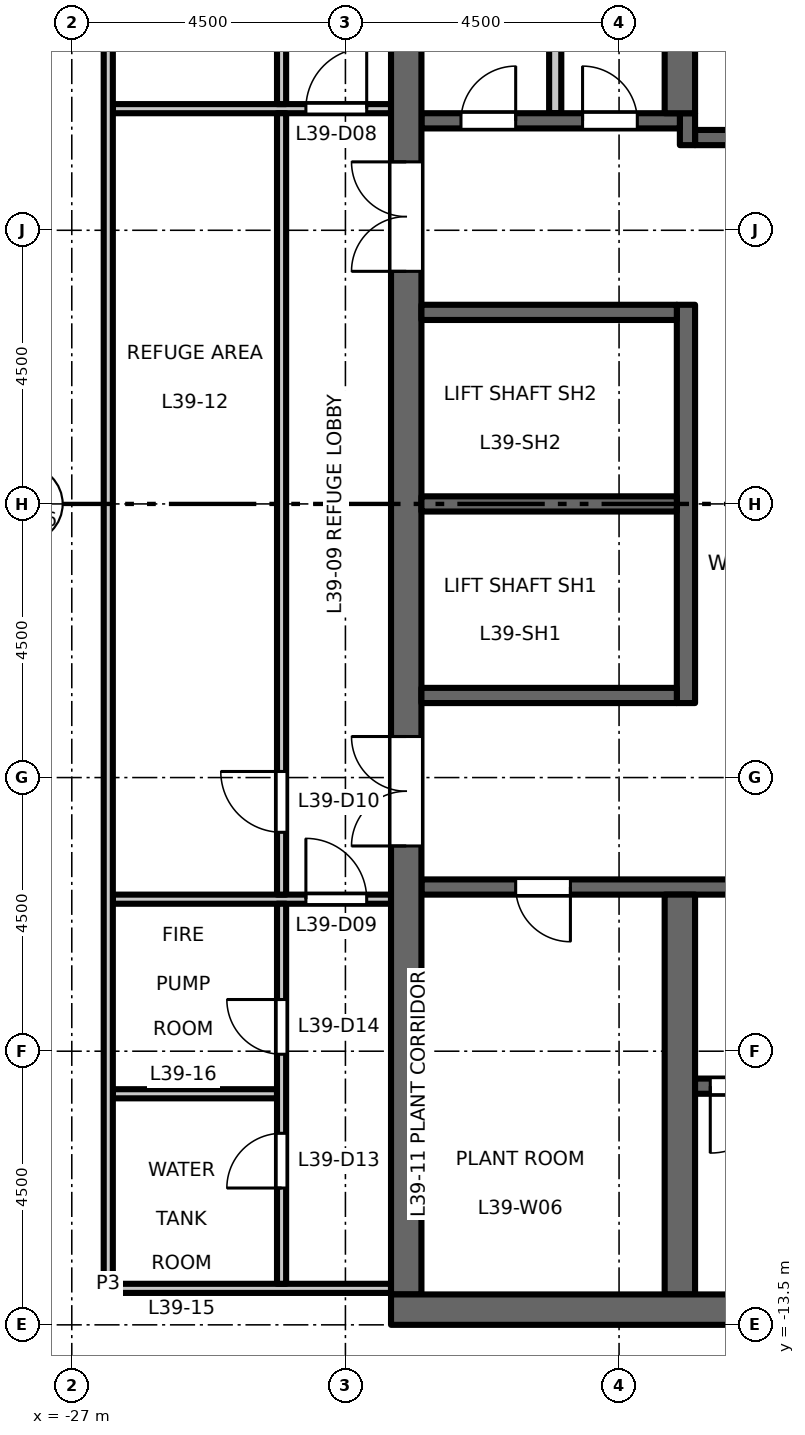
"""IFC4 building model, lengths in metres.
Left out: names, types, materials, properties, quantities, classifications, styles, units other than length and angle.
Written with IfcOpenShell. Run it as: python <this file> out.ifc"""

import sys

from ifc_helpers import new_model, si_unit, direction, frame, frame_2d, origin, place, context, subcontext, project, spatial, rectangle, extrude, element, fill, save


model = new_model("IFC4")
c1 = context("Model", 3, precision=1e-05, world=origin(), true_north=direction((0.0, 1.0)))
c2 = subcontext(c1, "Body", "Model", "MODEL_VIEW")
j1 = project(units=[si_unit("LENGTHUNIT", "METRE"), si_unit("PLANEANGLEUNIT", "RADIAN")], contexts=[c1])
p1 = place(None, origin())
s1 = spatial("IfcSite", under=j1, at=p1, CompositionType="ELEMENT")
p2 = place(p1, origin())
s2 = spatial("IfcBuilding", under=s1, at=p2, CompositionType="ELEMENT")
p3 = place(p2, frame((0.0, 0.0, 181.2)))
s3 = spatial("IfcBuildingStorey", under=s2, at=p3, CompositionType="ELEMENT", Elevation=181.2)
p4 = place(p3, frame((-12.15, 6.025, 0.0), z_axis=(0.0, 0.0, 1.0), x_axis=(-1.0, 0.0, 0.0)))
e1 = element("IfcWall", 1, at=p4, inside=s3, PredefinedType="SHEAR", context=c2, shape_type="SweptSolid", body=[
    extrude(rectangle(XDim=4.6, YDim=0.25, at=frame_2d((2.3, 0.0))), origin(), (0.0, 0.0, 1.0), 5.8),
])
p5 = place(p4, frame((1.8, 0.0, 0.0)))
e2 = element("IfcOpeningElement", 2, at=p5, cuts=e1, PredefinedType="OPENING", context=c2, shape_type="SweptSolid", body=[
    extrude(rectangle(XDim=1.0, YDim=2.1, at=frame_2d((0.5, 1.05))), frame((0.0, 0.135, 0.0), z_axis=(0.0, -1.0, 0.0), x_axis=(1.0, 0.0, 0.0)), (0.0, 0.0, 1.0), 0.27),
])
p6 = place(p3, frame((-16.875, 5.9, 0.0), z_axis=(0.0, 0.0, 1.0), x_axis=(0.0, 1.0, 0.0)))
e3 = element("IfcWall", 3, at=p6, inside=s3, PredefinedType="SHEAR", context=c2, shape_type="SweptSolid", body=[
    extrude(rectangle(XDim=0.525, YDim=0.25, at=frame_2d((0.263, 0.0))), origin(), (0.0, 0.0, 1.0), 5.8),
])
p7 = place(p3, frame((-17.0, 6.3, 0.0), z_axis=(0.0, 0.0, 1.0), x_axis=(-1.0, 0.0, 0.0)))
e4 = element("IfcWall", 4, at=p7, inside=s3, PredefinedType="SHEAR", context=c2, shape_type="SweptSolid", body=[
    extrude(rectangle(XDim=4.25, YDim=0.25, at=frame_2d((2.125, 0.0))), origin(), (0.0, 0.0, 1.0), 5.8),
])
p8 = place(p7, frame((0.7, 0.0, 0.0)))
e5 = element("IfcOpeningElement", 5, at=p8, cuts=e4, PredefinedType="OPENING", context=c2, shape_type="SweptSolid", body=[
    extrude(rectangle(XDim=0.9, YDim=2.1, at=frame_2d((0.45, 1.05))), frame((0.0, 0.135, 0.0), z_axis=(0.0, -1.0, 0.0), x_axis=(1.0, 0.0, 0.0)), (0.0, 0.0, 1.0), 0.27),
])
p9 = place(p7, frame((2.7, 0.0, 0.0)))
e6 = element("IfcOpeningElement", 6, at=p9, cuts=e4, PredefinedType="OPENING", context=c2, shape_type="SweptSolid", body=[
    extrude(rectangle(XDim=0.9, YDim=2.1, at=frame_2d((0.45, 1.05))), frame((0.0, 0.135, 0.0), z_axis=(0.0, -1.0, 0.0), x_axis=(1.0, 0.0, 0.0)), (0.0, 0.0, 1.0), 0.27),
])
p10 = place(p3, frame((-12.15, -6.3, 0.0), z_axis=(0.0, 0.0, 1.0), x_axis=(-1.0, 0.0, 0.0)))
e7 = element("IfcWall", 7, at=p10, inside=s3, PredefinedType="SHEAR", context=c2, shape_type="SweptSolid", body=[
    extrude(rectangle(XDim=9.1, YDim=0.25, at=frame_2d((4.55, 0.0))), origin(), (0.0, 0.0, 1.0), 5.8),
])
p11 = place(p10, frame((1.8, 0.0, 0.0)))
e8 = element("IfcOpeningElement", 8, at=p11, cuts=e7, PredefinedType="OPENING", context=c2, shape_type="SweptSolid", body=[
    extrude(rectangle(XDim=1.0, YDim=2.1, at=frame_2d((0.5, 1.05))), frame((0.0, 0.135, 0.0), z_axis=(0.0, -1.0, 0.0), x_axis=(1.0, 0.0, 0.0)), (0.0, 0.0, 1.0), 0.27),
])
p12 = place(p10, frame((6.65, 0.0, 0.0)))
e9 = element("IfcOpeningElement", 9, at=p12, cuts=e7, PredefinedType="OPENING", context=c2, shape_type="SweptSolid", body=[
    extrude(rectangle(XDim=0.9, YDim=2.1, at=frame_2d((0.45, 1.05))), frame((0.0, 0.135, 0.0), z_axis=(0.0, -1.0, 0.0), x_axis=(1.0, 0.0, 0.0)), (0.0, 0.0, 1.0), 0.27),
])
p13 = place(p3, frame((-21.5, -13.0, 0.0), z_axis=(0.0, 0.0, 1.0), x_axis=(0.0, 1.0, 0.0)))
e10 = element("IfcWall", 10, at=p13, inside=s3, PredefinedType="SHEAR", context=c2, shape_type="SweptSolid", body=[
    extrude(rectangle(XDim=26.0, YDim=0.5, at=frame_2d((13.0, 0.0))), origin(), (0.0, 0.0, 1.0), 5.8),
])
p14 = place(p13, frame((16.825, 0.0, 0.0)))
e11 = element("IfcOpeningElement", 11, at=p14, cuts=e10, PredefinedType="OPENING", context=c2, shape_type="SweptSolid", body=[
    extrude(rectangle(XDim=1.8, YDim=2.1, at=frame_2d((0.9, 1.05))), frame((0.0, 0.26, 0.0), z_axis=(0.0, -1.0, 0.0), x_axis=(1.0, 0.0, 0.0)), (0.0, 0.0, 1.0), 0.52),
])
p15 = place(p13, frame((7.375, 0.0, 0.0)))
e12 = element("IfcOpeningElement", 12, at=p15, cuts=e10, PredefinedType="OPENING", context=c2, shape_type="SweptSolid", body=[
    extrude(rectangle(XDim=1.8, YDim=2.1, at=frame_2d((0.9, 1.05))), frame((0.0, 0.26, 0.0), z_axis=(0.0, -1.0, 0.0), x_axis=(1.0, 0.0, 0.0)), (0.0, 0.0, 1.0), 0.52),
])
p16 = place(p3, frame((-19.05, 6.425, 0.0), z_axis=(0.0, 0.0, 1.0), x_axis=(0.0, 1.0, 0.0)))
e13 = element("IfcWall", 13, at=p16, inside=s3, PredefinedType="PARTITIONING", context=c2, shape_type="SweptSolid", body=[
    extrude(rectangle(XDim=6.575, YDim=0.2, at=frame_2d((3.288, 0.0))), origin(), (0.0, 0.0, 1.0), 5.8),
])
p17 = place(p3, frame((-16.9, -3.275, 0.0), z_axis=(0.0, 0.0, 1.0), x_axis=(0.0, 1.0, 0.0)))
e14 = element("IfcWall", 14, at=p17, inside=s3, PredefinedType="SHEAR", context=c2, shape_type="SweptSolid", body=[
    extrude(rectangle(XDim=6.55, YDim=0.3, at=frame_2d((3.275, 0.0))), origin(), (0.0, 0.0, 1.0), 5.8),
])
for number, where, z_axis, x_axis in (
    (15, (-17.05, 0.0, 0.0), (0.0, 0.0, 1.0), (-1.0, 0.0, 0.0)),
    (16, (-17.05, 3.15, 0.0), (0.0, 0.0, 1.0), (-1.0, 0.0, 0.0)),
    (17, (-17.05, -3.15, 0.0), (0.0, 0.0, 1.0), (-1.0, 0.0, 0.0)),
):
    element("IfcWall", number, at=place(p3, frame(where, z_axis=z_axis, x_axis=x_axis)), inside=s3, PredefinedType="SHEAR", context=c2, shape_type="SweptSolid", body=[
        extrude(rectangle(XDim=4.2, YDim=0.25, at=frame_2d((2.1, 0.0))), origin(), (0.0, 0.0, 1.0), 5.8),
    ])
for number, where, z_axis, x_axis in (
    (18, (-17.0, 6.425, 0.0), (0.0, 0.0, 1.0), (0.0, 1.0, 0.0)),
    (19, (-17.0, -13.0, 0.0), (0.0, 0.0, 1.0), (0.0, 1.0, 0.0)),
):
    element("IfcWall", number, at=place(p3, frame(where, z_axis=z_axis, x_axis=x_axis)), inside=s3, PredefinedType="SHEAR", context=c2, shape_type="SweptSolid", body=[
        extrude(rectangle(XDim=6.575, YDim=0.5, at=frame_2d((3.288, 0.0))), origin(), (0.0, 0.0, 1.0), 5.8),
    ])
p18 = place(p3, frame((-8.75, -9.575, 0.0), z_axis=(0.0, 0.0, 1.0), x_axis=(-1.0, 0.0, 0.0)))
e20 = element("IfcWall", 20, at=p18, inside=s3, PredefinedType="SHEAR", context=c2, shape_type="SweptSolid", body=[
    extrude(rectangle(XDim=8.0, YDim=0.25, at=frame_2d((4.0, 0.0))), origin(), (0.0, 0.0, 1.0), 5.8),
])
p19 = place(p18, frame((6.65, 0.0, 0.0)))
e21 = element("IfcOpeningElement", 21, at=p19, cuts=e20, PredefinedType="OPENING", context=c2, shape_type="SweptSolid", body=[
    extrude(rectangle(XDim=1.1, YDim=2.1, at=frame_2d((0.55, 1.05))), frame((0.0, 0.135, 0.0), z_axis=(0.0, -1.0, 0.0), x_axis=(1.0, 0.0, 0.0)), (0.0, 0.0, 1.0), 0.27),
])
p20 = place(p3, frame((-8.25, -13.25, 0.0), z_axis=(0.0, 0.0, 1.0), x_axis=(-1.0, 0.0, 0.0)))
e22 = element("IfcWall", 22, at=p20, inside=s3, PredefinedType="SHEAR", context=c2, shape_type="SweptSolid", body=[
    extrude(rectangle(XDim=13.5, YDim=0.5, at=frame_2d((6.75, 0.0))), origin(), (0.0, 0.0, 1.0), 5.8),
])
p21 = place(p3, frame((-26.475, -12.9, 0.0), z_axis=(0.0, 0.0, 1.0), x_axis=(1.0, 0.0, 0.0)))
e23 = element("IfcWall", 23, at=p21, inside=s3, PredefinedType="PARTITIONING", context=c2, shape_type="SweptSolid", body=[
    extrude(rectangle(XDim=4.725, YDim=0.15, at=frame_2d((2.363, 0.0))), origin(), (0.0, 0.0, 1.0), 5.8),
])
p22 = place(p3, frame((-26.325, -9.7, 0.0), z_axis=(0.0, 0.0, 1.0), x_axis=(1.0, 0.0, 0.0)))
e24 = element("IfcWall", 24, at=p22, inside=s3, PredefinedType="PARTITIONING", context=c2, shape_type="SweptSolid", body=[
    extrude(rectangle(XDim=2.7, YDim=0.15, at=frame_2d((1.35, 0.0))), origin(), (0.0, 0.0, 1.0), 5.8),
])
p23 = place(p3, frame((-26.325, -6.5, 0.0), z_axis=(0.0, 0.0, 1.0), x_axis=(1.0, 0.0, 0.0)))
e25 = element("IfcWall", 25, at=p23, inside=s3, PredefinedType="PARTITIONING", context=c2, shape_type="SweptSolid", body=[
    extrude(rectangle(XDim=4.575, YDim=0.15, at=frame_2d((2.288, 0.0))), origin(), (0.0, 0.0, 1.0), 5.8),
])
p24 = place(p23, frame((3.175, 0.0, 0.0)))
e26 = element("IfcOpeningElement", 26, at=p24, cuts=e25, PredefinedType="OPENING", context=c2, shape_type="SweptSolid", body=[
    extrude(rectangle(XDim=1.0, YDim=2.1, at=frame_2d((0.5, 1.05))), frame((0.0, 0.085, 0.0), z_axis=(0.0, -1.0, 0.0), x_axis=(1.0, 0.0, 0.0)), (0.0, 0.0, 1.0), 0.17),
])
p25 = place(p3, frame((-26.325, 6.5, 0.0), z_axis=(0.0, 0.0, 1.0), x_axis=(1.0, 0.0, 0.0)))
e27 = element("IfcWall", 27, at=p25, inside=s3, PredefinedType="PARTITIONING", context=c2, shape_type="SweptSolid", body=[
    extrude(rectangle(XDim=4.575, YDim=0.15, at=frame_2d((2.288, 0.0))), origin(), (0.0, 0.0, 1.0), 5.8),
])
p26 = place(p25, frame((3.175, 0.0, 0.0)))
e28 = element("IfcOpeningElement", 28, at=p26, cuts=e27, PredefinedType="OPENING", context=c2, shape_type="SweptSolid", body=[
    extrude(rectangle(XDim=1.0, YDim=2.1, at=frame_2d((0.5, 1.05))), frame((0.0, 0.085, 0.0), z_axis=(0.0, -1.0, 0.0), x_axis=(1.0, 0.0, 0.0)), (0.0, 0.0, 1.0), 0.17),
])
p27 = place(p3, frame((-26.4, -12.825, 0.0), z_axis=(0.0, 0.0, 1.0), x_axis=(0.0, 1.0, 0.0)))
e29 = element("IfcWall", 29, at=p27, inside=s3, PredefinedType="PARTITIONING", context=c2, shape_type="SweptSolid", body=[
    extrude(rectangle(XDim=25.65, YDim=0.15, at=frame_2d((12.825, 0.0))), origin(), (0.0, 0.0, 1.0), 5.8),
])
p28 = place(p3, frame((-23.55, -12.825, 0.0), z_axis=(0.0, 0.0, 1.0), x_axis=(0.0, 1.0, 0.0)))
e30 = element("IfcWall", 30, at=p28, inside=s3, PredefinedType="PARTITIONING", context=c2, shape_type="SweptSolid", body=[
    extrude(rectangle(XDim=6.25, YDim=0.15, at=frame_2d((3.125, 0.0))), origin(), (0.0, 0.0, 1.0), 5.8),
])
p29 = place(p28, frame((1.575, 0.0, 0.0)))
e31 = element("IfcOpeningElement", 31, at=p29, cuts=e30, PredefinedType="OPENING", context=c2, shape_type="SweptSolid", body=[
    extrude(rectangle(XDim=0.9, YDim=2.1, at=frame_2d((0.45, 1.05))), frame((0.0, 0.085, 0.0), z_axis=(0.0, -1.0, 0.0), x_axis=(1.0, 0.0, 0.0)), (0.0, 0.0, 1.0), 0.17),
])
p30 = place(p28, frame((3.775, 0.0, 0.0)))
e32 = element("IfcOpeningElement", 32, at=p30, cuts=e30, PredefinedType="OPENING", context=c2, shape_type="SweptSolid", body=[
    extrude(rectangle(XDim=0.9, YDim=2.1, at=frame_2d((0.45, 1.05))), frame((0.0, 0.085, 0.0), z_axis=(0.0, -1.0, 0.0), x_axis=(1.0, 0.0, 0.0)), (0.0, 0.0, 1.0), 0.17),
])
p31 = place(p3, frame((-23.55, -6.425, 0.0), z_axis=(0.0, 0.0, 1.0), x_axis=(0.0, 1.0, 0.0)))
e33 = element("IfcWall", 33, at=p31, inside=s3, PredefinedType="PARTITIONING", context=c2, shape_type="SweptSolid", body=[
    extrude(rectangle(XDim=12.85, YDim=0.15, at=frame_2d((6.425, 0.0))), origin(), (0.0, 0.0, 1.0), 5.8),
])
p32 = place(p31, frame((1.025, 0.0, 0.0)))
e34 = element("IfcOpeningElement", 34, at=p32, cuts=e33, PredefinedType="OPENING", context=c2, shape_type="SweptSolid", body=[
    extrude(rectangle(XDim=1.0, YDim=2.1, at=frame_2d((0.5, 1.05))), frame((0.0, 0.085, 0.0), z_axis=(0.0, -1.0, 0.0), x_axis=(1.0, 0.0, 0.0)), (0.0, 0.0, 1.0), 0.17),
])
p33 = place(p3, frame((-23.55, 6.575, 0.0), z_axis=(0.0, 0.0, 1.0), x_axis=(0.0, 1.0, 0.0)))
e35 = element("IfcWall", 35, at=p33, inside=s3, PredefinedType="PARTITIONING", context=c2, shape_type="SweptSolid", body=[
    extrude(rectangle(XDim=6.25, YDim=0.15, at=frame_2d((3.125, 0.0))), origin(), (0.0, 0.0, 1.0), 5.8),
])
p34 = place(p33, frame((1.575, 0.0, 0.0)))
e36 = element("IfcOpeningElement", 36, at=p34, cuts=e35, PredefinedType="OPENING", context=c2, shape_type="SweptSolid", body=[
    extrude(rectangle(XDim=0.9, YDim=2.1, at=frame_2d((0.45, 1.05))), frame((0.0, 0.085, 0.0), z_axis=(0.0, -1.0, 0.0), x_axis=(1.0, 0.0, 0.0)), (0.0, 0.0, 1.0), 0.17),
])
p35 = place(p33, frame((3.775, 0.0, 0.0)))
e37 = element("IfcOpeningElement", 37, at=p35, cuts=e35, PredefinedType="OPENING", context=c2, shape_type="SweptSolid", body=[
    extrude(rectangle(XDim=0.9, YDim=2.1, at=frame_2d((0.45, 1.05))), frame((0.0, 0.085, 0.0), z_axis=(0.0, -1.0, 0.0), x_axis=(1.0, 0.0, 0.0)), (0.0, 0.0, 1.0), 0.17),
])
p36 = place(p19, origin())
e38 = element("IfcDoor", 38, at=p36, inside=s3, OperationType="SINGLE_SWING_LEFT", PredefinedType="DOOR", context=c2, shape_type="SweptSolid", body=[
    extrude(rectangle(XDim=1.1, YDim=2.1, at=frame_2d((0.55, 1.05))), frame((0.0, 0.025, 0.0), z_axis=(0.0, -1.0, 0.0), x_axis=(1.0, 0.0, 0.0)), (0.0, 0.0, 1.0), 0.05),
])
fill(e21, e38)
p37 = place(p14, origin())
e39 = element("IfcDoor", 39, at=p37, inside=s3, OperationType="DOUBLE_DOOR_DOUBLE_SWING", PredefinedType="DOOR", context=c2, shape_type="SweptSolid", body=[
    extrude(rectangle(XDim=1.8, YDim=2.1, at=frame_2d((0.9, 1.05))), frame((0.0, 0.025, 0.0), z_axis=(0.0, -1.0, 0.0), x_axis=(1.0, 0.0, 0.0)), (0.0, 0.0, 1.0), 0.05),
])
fill(e11, e39)
p38 = place(p15, origin())
e40 = element("IfcDoor", 40, at=p38, inside=s3, OperationType="DOUBLE_DOOR_DOUBLE_SWING", PredefinedType="DOOR", context=c2, shape_type="SweptSolid", body=[
    extrude(rectangle(XDim=1.8, YDim=2.1, at=frame_2d((0.9, 1.05))), frame((0.0, 0.025, 0.0), z_axis=(0.0, -1.0, 0.0), x_axis=(1.0, 0.0, 0.0)), (0.0, 0.0, 1.0), 0.05),
])
fill(e12, e40)
p39 = place(p8, origin())
e41 = element("IfcDoor", 41, at=p39, inside=s3, OperationType="SINGLE_SWING_RIGHT", PredefinedType="DOOR", context=c2, shape_type="SweptSolid", body=[
    extrude(rectangle(XDim=0.9, YDim=2.1, at=frame_2d((0.45, 1.05))), frame((0.0, 0.025, 0.0), z_axis=(0.0, -1.0, 0.0), x_axis=(1.0, 0.0, 0.0)), (0.0, 0.0, 1.0), 0.05),
])
fill(e5, e41)
p40 = place(p9, origin())
e42 = element("IfcDoor", 42, at=p40, inside=s3, OperationType="SINGLE_SWING_LEFT", PredefinedType="DOOR", context=c2, shape_type="SweptSolid", body=[
    extrude(rectangle(XDim=0.9, YDim=2.1, at=frame_2d((0.45, 1.05))), frame((0.0, 0.025, 0.0), z_axis=(0.0, -1.0, 0.0), x_axis=(1.0, 0.0, 0.0)), (0.0, 0.0, 1.0), 0.05),
])
fill(e6, e42)
p41 = place(p12, origin())
e43 = element("IfcDoor", 43, at=p41, inside=s3, OperationType="SINGLE_SWING_RIGHT", PredefinedType="DOOR", context=c2, shape_type="SweptSolid", body=[
    extrude(rectangle(XDim=0.9, YDim=2.1, at=frame_2d((0.45, 1.05))), frame((0.0, 0.025, 0.0), z_axis=(0.0, -1.0, 0.0), x_axis=(1.0, 0.0, 0.0)), (0.0, 0.0, 1.0), 0.05),
])
fill(e9, e43)
p42 = place(p26, origin())
e44 = element("IfcDoor", 44, at=p42, inside=s3, OperationType="SINGLE_SWING_RIGHT", PredefinedType="DOOR", context=c2, shape_type="SweptSolid", body=[
    extrude(rectangle(XDim=1.0, YDim=2.1, at=frame_2d((0.5, 1.05))), frame((0.0, 0.025, 0.0), z_axis=(0.0, -1.0, 0.0), x_axis=(1.0, 0.0, 0.0)), (0.0, 0.0, 1.0), 0.05),
])
fill(e28, e44)
p43 = place(p24, origin())
e45 = element("IfcDoor", 45, at=p43, inside=s3, OperationType="SINGLE_SWING_LEFT", PredefinedType="DOOR", context=c2, shape_type="SweptSolid", body=[
    extrude(rectangle(XDim=1.0, YDim=2.1, at=frame_2d((0.5, 1.05))), frame((0.0, 0.025, 0.0), z_axis=(0.0, -1.0, 0.0), x_axis=(1.0, 0.0, 0.0)), (0.0, 0.0, 1.0), 0.05),
])
fill(e26, e45)
p44 = place(p32, origin())
e46 = element("IfcDoor", 46, at=p44, inside=s3, OperationType="SINGLE_SWING_RIGHT", PredefinedType="DOOR", context=c2, shape_type="SweptSolid", body=[
    extrude(rectangle(XDim=1.0, YDim=2.1, at=frame_2d((0.5, 1.05))), frame((0.0, 0.025, 0.0), z_axis=(0.0, -1.0, 0.0), x_axis=(1.0, 0.0, 0.0)), (0.0, 0.0, 1.0), 0.05),
])
fill(e34, e46)
p45 = place(p29, origin())
e47 = element("IfcDoor", 47, at=p45, inside=s3, OperationType="SINGLE_SWING_LEFT", PredefinedType="DOOR", context=c2, shape_type="SweptSolid", body=[
    extrude(rectangle(XDim=0.9, YDim=2.1, at=frame_2d((0.45, 1.05))), frame((0.0, 0.025, 0.0), z_axis=(0.0, -1.0, 0.0), x_axis=(1.0, 0.0, 0.0)), (0.0, 0.0, 1.0), 0.05),
])
fill(e31, e47)
p46 = place(p30, origin())
e48 = element("IfcDoor", 48, at=p46, inside=s3, OperationType="SINGLE_SWING_RIGHT", PredefinedType="DOOR", context=c2, shape_type="SweptSolid", body=[
    extrude(rectangle(XDim=0.9, YDim=2.1, at=frame_2d((0.45, 1.05))), frame((0.0, 0.025, 0.0), z_axis=(0.0, -1.0, 0.0), x_axis=(1.0, 0.0, 0.0)), (0.0, 0.0, 1.0), 0.05),
])
fill(e32, e48)
save(model, sys.argv[1])
